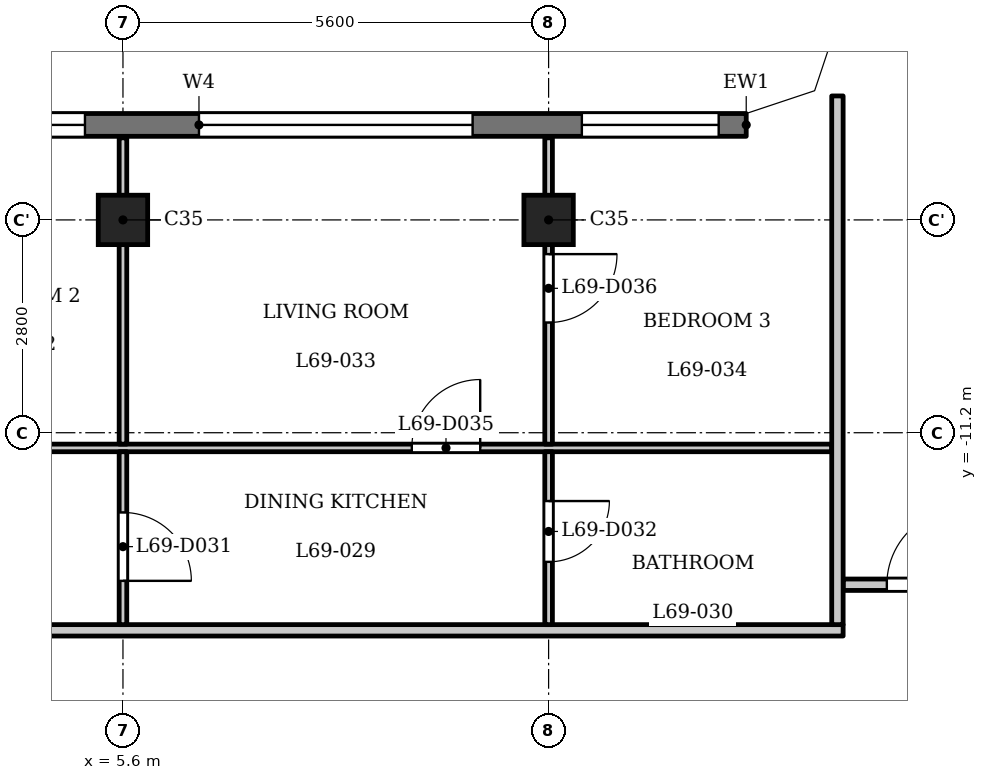
"""IFC4 building model, lengths in metres.
Left out: names, types, materials, properties, quantities, classifications, styles, units other than length and angle.
Written with IfcOpenShell. Run it as: python <this file> out.ifc"""

import sys

from ifc_helpers import new_model, si_unit, direction, frame, frame_2d, origin, origin_2d, place, context, subcontext, project, spatial, polyline, rectangle, outline, extrude, element, fill, save


model = new_model("IFC4")
c1 = context("Model", 3, precision=1e-05, world=origin(), true_north=direction((0.0, 1.0)))
c2 = subcontext(c1, "Body", "Model", "MODEL_VIEW")
j1 = project(units=[si_unit("LENGTHUNIT", "METRE"), si_unit("PLANEANGLEUNIT", "RADIAN")], contexts=[c1])
p1 = place(None, origin())
s1 = spatial("IfcSite", under=j1, at=p1, CompositionType="ELEMENT")
p2 = place(p1, origin())
s2 = spatial("IfcBuilding", under=s1, at=p2, CompositionType="ELEMENT")
p3 = place(p2, frame((0.0, 0.0, 266.2)))
s3 = spatial("IfcBuildingStorey", under=s2, at=p3, CompositionType="ELEMENT", Elevation=266.2)
for number, where, z_axis, x_axis in (
    (1, (5.6, -8.4, 0.0), (0.0, 0.0, 1.0), (1.0, 0.0, 0.0)),
    (2, (11.2, -8.4, 0.0), (0.0, 0.0, 1.0), (1.0, 0.0, 0.0)),
):
    element("IfcColumn", number, at=place(p3, frame(where, z_axis=z_axis, x_axis=x_axis)), inside=s3, PredefinedType="COLUMN", context=c2, shape_type="SweptSolid", body=[
        extrude(rectangle(XDim=0.65, YDim=0.65, at=origin_2d()), origin(), (0.0, 0.0, 1.0), 3.5),
    ])
p4 = place(p3, frame((13.8, -7.15, 0.0), z_axis=(0.0, 0.0, 1.0), x_axis=(-1.0, 0.0, 0.0)))
e3 = element("IfcWall", 3, at=p4, inside=s3, PredefinedType="SOLIDWALL", context=c2, shape_type="SweptSolid", body=[
    extrude(rectangle(XDim=27.6, YDim=0.3, at=frame_2d((13.8, 0.0))), origin(), (0.0, 0.0, 1.0), 3.2),
])
p5 = place(p4, frame((0.363, 0.0, 0.9)))
e4 = element("IfcOpeningElement", 4, at=p5, cuts=e3, PredefinedType="OPENING", context=c2, shape_type="SweptSolid", body=[
    extrude(rectangle(XDim=1.8, YDim=1.25, at=frame_2d((0.9, 0.625))), frame((0.0, 0.16, 0.0), z_axis=(0.0, -1.0, 0.0), x_axis=(1.0, 0.0, 0.0)), (0.0, 0.0, 1.0), 0.32),
])
p6 = place(p4, frame((3.6, 0.0, 1.2)))
e5 = element("IfcOpeningElement", 5, at=p6, cuts=e3, PredefinedType="OPENING", context=c2, shape_type="SweptSolid", body=[
    extrude(rectangle(XDim=3.6, YDim=0.95, at=frame_2d((1.8, 0.475))), frame((0.0, 0.16, 0.0), z_axis=(0.0, -1.0, 0.0), x_axis=(1.0, 0.0, 0.0)), (0.0, 0.0, 1.0), 0.32),
])
p7 = place(p4, frame((8.7, 0.0, 0.9)))
e6 = element("IfcOpeningElement", 6, at=p7, cuts=e3, PredefinedType="OPENING", context=c2, shape_type="SweptSolid", body=[
    extrude(rectangle(XDim=1.8, YDim=1.25, at=frame_2d((0.9, 0.625))), frame((0.0, 0.16, 0.0), z_axis=(0.0, -1.0, 0.0), x_axis=(1.0, 0.0, 0.0)), (0.0, 0.0, 1.0), 0.32),
])
p8 = place(p4, frame((11.5, 0.0, 0.9)))
e7 = element("IfcOpeningElement", 7, at=p8, cuts=e3, PredefinedType="OPENING", context=c2, shape_type="SweptSolid", body=[
    extrude(rectangle(XDim=1.8, YDim=1.25, at=frame_2d((0.9, 0.625))), frame((0.0, 0.16, 0.0), z_axis=(0.0, -1.0, 0.0), x_axis=(1.0, 0.0, 0.0)), (0.0, 0.0, 1.0), 0.32),
])
p9 = place(p4, frame((14.8, 0.0, 1.2)))
e8 = element("IfcOpeningElement", 8, at=p9, cuts=e3, PredefinedType="OPENING", context=c2, shape_type="SweptSolid", body=[
    extrude(rectangle(XDim=3.6, YDim=0.95, at=frame_2d((1.8, 0.475))), frame((0.0, 0.16, 0.0), z_axis=(0.0, -1.0, 0.0), x_axis=(1.0, 0.0, 0.0)), (0.0, 0.0, 1.0), 0.32),
])
p10 = place(p4, frame((20.4, 0.0, 1.2)))
e9 = element("IfcOpeningElement", 9, at=p10, cuts=e3, PredefinedType="OPENING", context=c2, shape_type="SweptSolid", body=[
    extrude(rectangle(XDim=3.6, YDim=0.95, at=frame_2d((1.8, 0.475))), frame((0.0, 0.16, 0.0), z_axis=(0.0, -1.0, 0.0), x_axis=(1.0, 0.0, 0.0)), (0.0, 0.0, 1.0), 0.32),
])
p11 = place(p4, frame((25.438, 0.0, 0.9)))
e10 = element("IfcOpeningElement", 10, at=p11, cuts=e3, PredefinedType="OPENING", context=c2, shape_type="SweptSolid", body=[
    extrude(rectangle(XDim=1.8, YDim=1.25, at=frame_2d((0.9, 0.625))), frame((0.0, 0.16, 0.0), z_axis=(0.0, -1.0, 0.0), x_axis=(1.0, 0.0, 0.0)), (0.0, 0.0, 1.0), 0.32),
])
p12 = place(p3, frame((-15.075, -13.8, 0.0), z_axis=(0.0, 0.0, 1.0), x_axis=(1.0, 0.0, 0.0)))
e11 = element("IfcWall", 11, at=p12, inside=s3, PredefinedType="PARTITIONING", context=c2, shape_type="SweptSolid", body=[
    extrude(rectangle(XDim=30.15, YDim=0.15, at=frame_2d((15.075, 0.0))), origin(), (0.0, 0.0, 1.0), 3.2),
])
p13 = place(p12, frame((2.225, 0.0, 0.0)))
e12 = element("IfcOpeningElement", 12, at=p13, cuts=e11, PredefinedType="OPENING", context=c2, shape_type="SweptSolid", body=[
    extrude(rectangle(XDim=1.0, YDim=2.1, at=frame_2d((0.5, 1.05))), frame((0.0, 0.085, 0.0), z_axis=(0.0, -1.0, 0.0), x_axis=(1.0, 0.0, 0.0)), (0.0, 0.0, 1.0), 0.17),
])
p14 = place(p12, frame((10.825, 0.0, 0.0)))
e13 = element("IfcOpeningElement", 13, at=p14, cuts=e11, PredefinedType="OPENING", context=c2, shape_type="SweptSolid", body=[
    extrude(rectangle(XDim=1.0, YDim=2.1, at=frame_2d((0.5, 1.05))), frame((0.0, 0.085, 0.0), z_axis=(0.0, -1.0, 0.0), x_axis=(1.0, 0.0, 0.0)), (0.0, 0.0, 1.0), 0.17),
])
p15 = place(p12, frame((15.775, 0.0, 0.0)))
e14 = element("IfcOpeningElement", 14, at=p15, cuts=e11, PredefinedType="OPENING", context=c2, shape_type="SweptSolid", body=[
    extrude(rectangle(XDim=1.0, YDim=2.1, at=frame_2d((0.5, 1.05))), frame((0.0, 0.085, 0.0), z_axis=(0.0, -1.0, 0.0), x_axis=(1.0, 0.0, 0.0)), (0.0, 0.0, 1.0), 0.17),
])
p16 = place(p3, frame((15.075, -13.2, 0.0), z_axis=(0.0, 0.0, 1.0), x_axis=(1.0, 0.0, 0.0)))
e15 = element("IfcWall", 15, at=p16, inside=s3, PredefinedType="PARTITIONING", context=c2, shape_type="SweptSolid", body=[
    extrude(rectangle(XDim=2.325, YDim=0.15, at=frame_2d((1.163, 0.0))), origin(), (0.0, 0.0, 1.0), 3.2),
])
p17 = place(p16, frame((0.575, 0.0, 0.0)))
e16 = element("IfcOpeningElement", 16, at=p17, cuts=e15, PredefinedType="OPENING", context=c2, shape_type="SweptSolid", body=[
    extrude(rectangle(XDim=1.0, YDim=2.1, at=frame_2d((0.5, 1.05))), frame((0.0, 0.085, 0.0), z_axis=(0.0, -1.0, 0.0), x_axis=(1.0, 0.0, 0.0)), (0.0, 0.0, 1.0), 0.17),
])
p18 = place(p3, frame((-14.925, -11.4, 0.0), z_axis=(0.0, 0.0, 1.0), x_axis=(1.0, 0.0, 0.0)))
e17 = element("IfcWall", 17, at=p18, inside=s3, PredefinedType="PARTITIONING", context=c2, shape_type="SweptSolid", body=[
    extrude(rectangle(XDim=29.85, YDim=0.1, at=frame_2d((14.925, 0.0))), origin(), (0.0, 0.0, 1.0), 3.2),
])
p19 = place(p18, frame((7.875, 0.0, 0.0)))
e18 = element("IfcOpeningElement", 18, at=p19, cuts=e17, PredefinedType="OPENING", context=c2, shape_type="SweptSolid", body=[
    extrude(rectangle(XDim=0.8, YDim=2.1, at=frame_2d((0.4, 1.05))), frame((0.0, 0.06, 0.0), z_axis=(0.0, -1.0, 0.0), x_axis=(1.0, 0.0, 0.0)), (0.0, 0.0, 1.0), 0.12),
])
p20 = place(p18, frame((1.175, 0.0, 0.0)))
e19 = element("IfcOpeningElement", 19, at=p20, cuts=e17, PredefinedType="OPENING", context=c2, shape_type="SweptSolid", body=[
    extrude(rectangle(XDim=0.9, YDim=2.1, at=frame_2d((0.45, 1.05))), frame((0.0, 0.06, 0.0), z_axis=(0.0, -1.0, 0.0), x_axis=(1.0, 0.0, 0.0)), (0.0, 0.0, 1.0), 0.12),
])
p21 = place(p18, frame((13.475, 0.0, 0.0)))
e20 = element("IfcOpeningElement", 20, at=p21, cuts=e17, PredefinedType="OPENING", context=c2, shape_type="SweptSolid", body=[
    extrude(rectangle(XDim=0.8, YDim=2.1, at=frame_2d((0.4, 1.05))), frame((0.0, 0.06, 0.0), z_axis=(0.0, -1.0, 0.0), x_axis=(1.0, 0.0, 0.0)), (0.0, 0.0, 1.0), 0.12),
])
p22 = place(p18, frame((9.775, 0.0, 0.0)))
e21 = element("IfcOpeningElement", 21, at=p22, cuts=e17, PredefinedType="OPENING", context=c2, shape_type="SweptSolid", body=[
    extrude(rectangle(XDim=0.9, YDim=2.1, at=frame_2d((0.45, 1.05))), frame((0.0, 0.06, 0.0), z_axis=(0.0, -1.0, 0.0), x_axis=(1.0, 0.0, 0.0)), (0.0, 0.0, 1.0), 0.12),
])
p23 = place(p18, frame((16.675, 0.0, 0.0)))
e22 = element("IfcOpeningElement", 22, at=p23, cuts=e17, PredefinedType="OPENING", context=c2, shape_type="SweptSolid", body=[
    extrude(rectangle(XDim=0.9, YDim=2.1, at=frame_2d((0.45, 1.05))), frame((0.0, 0.06, 0.0), z_axis=(0.0, -1.0, 0.0), x_axis=(1.0, 0.0, 0.0)), (0.0, 0.0, 1.0), 0.12),
])
p24 = place(p18, frame((18.225, 0.0, 0.0)))
e23 = element("IfcOpeningElement", 23, at=p24, cuts=e17, PredefinedType="OPENING", context=c2, shape_type="SweptSolid", body=[
    extrude(rectangle(XDim=0.9, YDim=2.1, at=frame_2d((0.45, 1.05))), frame((0.0, 0.06, 0.0), z_axis=(0.0, -1.0, 0.0), x_axis=(1.0, 0.0, 0.0)), (0.0, 0.0, 1.0), 0.12),
])
p25 = place(p18, frame((24.325, 0.0, 0.0)))
e24 = element("IfcOpeningElement", 24, at=p25, cuts=e17, PredefinedType="OPENING", context=c2, shape_type="SweptSolid", body=[
    extrude(rectangle(XDim=0.9, YDim=2.1, at=frame_2d((0.45, 1.05))), frame((0.0, 0.06, 0.0), z_axis=(0.0, -1.0, 0.0), x_axis=(1.0, 0.0, 0.0)), (0.0, 0.0, 1.0), 0.12),
])
p26 = place(p3, frame((5.6, -13.725, 0.0), z_axis=(0.0, 0.0, 1.0), x_axis=(0.0, 1.0, 0.0)))
e25 = element("IfcWall", 25, at=p26, inside=s3, PredefinedType="PARTITIONING", context=c2, shape_type="SweptSolid", body=[
    extrude(rectangle(XDim=2.275, YDim=0.1, at=frame_2d((1.138, 0.0))), origin(), (0.0, 0.0, 1.0), 3.2),
])
p27 = place(p26, frame((0.576, 0.0, 0.0)))
e26 = element("IfcOpeningElement", 26, at=p27, cuts=e25, PredefinedType="OPENING", context=c2, shape_type="SweptSolid", body=[
    extrude(rectangle(XDim=0.9, YDim=2.1, at=frame_2d((0.45, 1.05))), frame((0.0, 0.06, 0.0), z_axis=(0.0, -1.0, 0.0), x_axis=(1.0, 0.0, 0.0)), (0.0, 0.0, 1.0), 0.12),
])
p28 = place(p3, frame((5.6, -11.35, 0.0), z_axis=(0.0, 0.0, 1.0), x_axis=(0.0, 1.0, 0.0)))
e27 = element("IfcWall", 27, at=p28, inside=s3, PredefinedType="PARTITIONING", context=c2, shape_type="SweptSolid", body=[
    extrude(rectangle(XDim=4.03, YDim=0.1, at=frame_2d((2.015, 0.0))), origin(), (0.0, 0.0, 1.0), 3.2),
])
p29 = place(p3, frame((11.2, -13.725, 0.0), z_axis=(0.0, 0.0, 1.0), x_axis=(0.0, 1.0, 0.0)))
e28 = element("IfcWall", 28, at=p29, inside=s3, PredefinedType="PARTITIONING", context=c2, shape_type="SweptSolid", body=[
    extrude(rectangle(XDim=2.275, YDim=0.1, at=frame_2d((1.138, 0.0))), origin(), (0.0, 0.0, 1.0), 3.2),
])
p30 = place(p29, frame((0.826, 0.0, 0.0)))
e29 = element("IfcOpeningElement", 29, at=p30, cuts=e28, PredefinedType="OPENING", context=c2, shape_type="SweptSolid", body=[
    extrude(rectangle(XDim=0.8, YDim=2.1, at=frame_2d((0.4, 1.05))), frame((0.0, 0.06, 0.0), z_axis=(0.0, -1.0, 0.0), x_axis=(1.0, 0.0, 0.0)), (0.0, 0.0, 1.0), 0.12),
])
p31 = place(p3, frame((11.2, -11.35, 0.0), z_axis=(0.0, 0.0, 1.0), x_axis=(0.0, 1.0, 0.0)))
e30 = element("IfcWall", 30, at=p31, inside=s3, PredefinedType="PARTITIONING", context=c2, shape_type="SweptSolid", body=[
    extrude(rectangle(XDim=4.03, YDim=0.1, at=frame_2d((2.015, 0.0))), origin(), (0.0, 0.0, 1.0), 3.2),
])
p32 = place(p31, frame((1.6, 0.0, 0.0)))
e31 = element("IfcOpeningElement", 31, at=p32, cuts=e30, PredefinedType="OPENING", context=c2, shape_type="SweptSolid", body=[
    extrude(rectangle(XDim=0.9, YDim=2.1, at=frame_2d((0.45, 1.05))), frame((0.0, 0.06, 0.0), z_axis=(0.0, -1.0, 0.0), x_axis=(1.0, 0.0, 0.0)), (0.0, 0.0, 1.0), 0.12),
])
p33 = place(p3, frame((15.0, -13.725, 0.0), z_axis=(0.0, 0.0, 1.0), x_axis=(0.0, 1.0, 0.0)))
e32 = element("IfcWall", 32, at=p33, inside=s3, PredefinedType="PARTITIONING", context=c2, shape_type="SweptSolid", body=[
    extrude(rectangle(XDim=6.956, YDim=0.15, at=frame_2d((3.478, 0.0))), origin(), (0.0, 0.0, 1.0), 3.2),
])
p34 = place(p3, origin())
e33 = element("IfcWall", 33, at=p34, inside=s3, PredefinedType="SOLIDWALL", context=c2, shape_type="SweptSolid", body=[
    extrude(outline(polyline([(14.937, -6.937), (15.3, -5.849), (15.3, -5.8), (15.0, -5.8), (14.7, -6.7), (13.8, -7.0), (13.8, -7.3), (13.849, -7.3), (14.937, -6.937)])), origin(), (0.0, 0.0, 1.0), 3.2),
])
p35 = place(p17, origin())
e34 = element("IfcDoor", 34, at=p35, inside=s3, OperationType="SINGLE_SWING_LEFT", PredefinedType="DOOR", context=c2, shape_type="SweptSolid", body=[
    extrude(rectangle(XDim=1.0, YDim=2.1, at=frame_2d((0.5, 1.05))), frame((0.0, 0.025, 0.0), z_axis=(0.0, -1.0, 0.0), x_axis=(1.0, 0.0, 0.0)), (0.0, 0.0, 1.0), 0.05),
])
fill(e16, e34)
p36 = place(p27, origin())
e35 = element("IfcDoor", 35, at=p36, inside=s3, OperationType="SINGLE_SWING_LEFT", PredefinedType="DOOR", context=c2, shape_type="SweptSolid", body=[
    extrude(rectangle(XDim=0.9, YDim=2.1, at=frame_2d((0.45, 1.05))), frame((0.0, 0.025, 0.0), z_axis=(0.0, -1.0, 0.0), x_axis=(1.0, 0.0, 0.0)), (0.0, 0.0, 1.0), 0.05),
])
fill(e26, e35)
p37 = place(p30, origin())
e36 = element("IfcDoor", 36, at=p37, inside=s3, OperationType="SINGLE_SWING_RIGHT", PredefinedType="DOOR", context=c2, shape_type="SweptSolid", body=[
    extrude(rectangle(XDim=0.8, YDim=2.1, at=frame_2d((0.4, 1.05))), frame((0.0, 0.025, 0.0), z_axis=(0.0, -1.0, 0.0), x_axis=(1.0, 0.0, 0.0)), (0.0, 0.0, 1.0), 0.05),
])
fill(e29, e36)
p38 = place(p25, origin())
e37 = element("IfcDoor", 37, at=p38, inside=s3, OperationType="SINGLE_SWING_LEFT", PredefinedType="DOOR", context=c2, shape_type="SweptSolid", body=[
    extrude(rectangle(XDim=0.9, YDim=2.1, at=frame_2d((0.45, 1.05))), frame((0.0, 0.025, 0.0), z_axis=(0.0, -1.0, 0.0), x_axis=(1.0, 0.0, 0.0)), (0.0, 0.0, 1.0), 0.05),
])
fill(e24, e37)
p39 = place(p32, origin())
e38 = element("IfcDoor", 38, at=p39, inside=s3, OperationType="SINGLE_SWING_RIGHT", PredefinedType="DOOR", context=c2, shape_type="SweptSolid", body=[
    extrude(rectangle(XDim=0.9, YDim=2.1, at=frame_2d((0.45, 1.05))), frame((0.0, 0.025, 0.0), z_axis=(0.0, -1.0, 0.0), x_axis=(1.0, 0.0, 0.0)), (0.0, 0.0, 1.0), 0.05),
])
fill(e31, e38)
p40 = place(p5, origin())
e39 = element("IfcWindow", 39, at=p40, inside=s3, PartitioningType="SINGLE_PANEL", PredefinedType="WINDOW", context=c2, shape_type="SweptSolid", body=[
    extrude(rectangle(XDim=1.8, YDim=1.25, at=frame_2d((0.9, 0.625))), frame((0.0, 0.03, 0.0), z_axis=(0.0, -1.0, 0.0), x_axis=(1.0, 0.0, 0.0)), (0.0, 0.0, 1.0), 0.06),
])
fill(e4, e39)
p41 = place(p6, origin())
e40 = element("IfcWindow", 40, at=p41, inside=s3, PartitioningType="SINGLE_PANEL", PredefinedType="WINDOW", context=c2, shape_type="SweptSolid", body=[
    extrude(rectangle(XDim=3.6, YDim=0.95, at=frame_2d((1.8, 0.475))), frame((0.0, 0.03, 0.0), z_axis=(0.0, -1.0, 0.0), x_axis=(1.0, 0.0, 0.0)), (0.0, 0.0, 1.0), 0.06),
])
fill(e5, e40)
p42 = place(p7, origin())
e41 = element("IfcWindow", 41, at=p42, inside=s3, PartitioningType="SINGLE_PANEL", PredefinedType="WINDOW", context=c2, shape_type="SweptSolid", body=[
    extrude(rectangle(XDim=1.8, YDim=1.25, at=frame_2d((0.9, 0.625))), frame((0.0, 0.03, 0.0), z_axis=(0.0, -1.0, 0.0), x_axis=(1.0, 0.0, 0.0)), (0.0, 0.0, 1.0), 0.06),
])
fill(e6, e41)
save(model, sys.argv[1])
